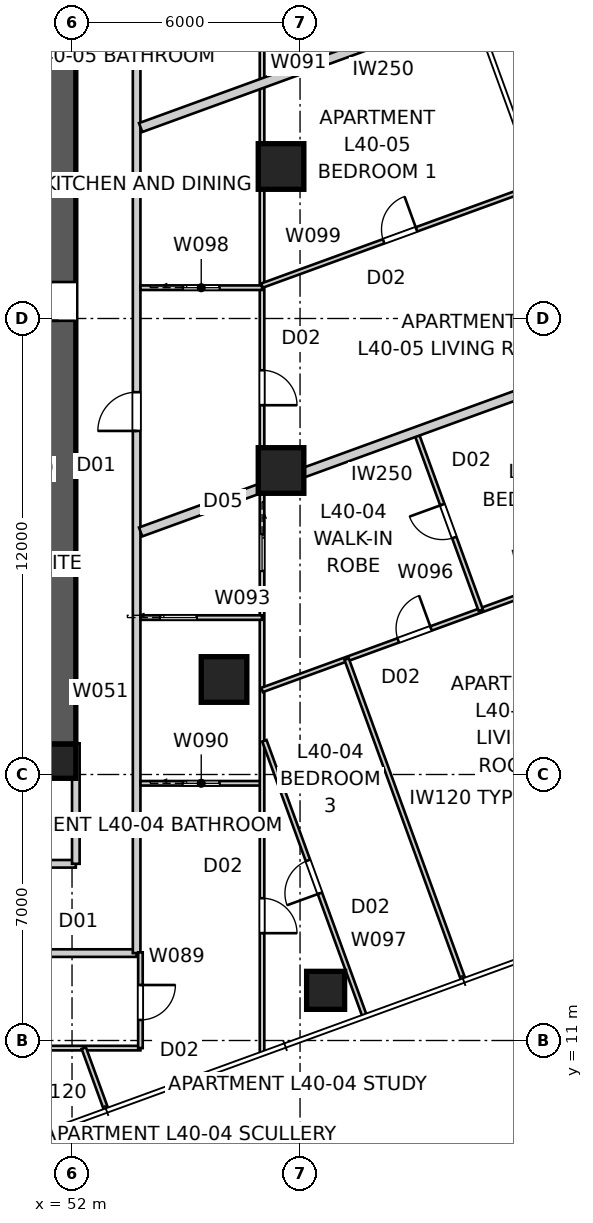
"""IFC4 building model, lengths in metres.
Left out: names, types, materials, properties, quantities, classifications, styles, units other than length and angle.
Written with IfcOpenShell. Run it as: python <this file> out.ifc"""

import sys

from ifc_helpers import new_model, si_unit, direction, frame, frame_2d, origin, origin_2d, place, context, subcontext, project, spatial, polyline, rectangle, outline, extrude, element, fill, save


model = new_model("IFC4")
c1 = context("Model", 3, precision=1e-05, world=origin(), true_north=direction((0.0, 1.0)))
c2 = subcontext(c1, "Body", "Model", "MODEL_VIEW")
j1 = project(units=[si_unit("LENGTHUNIT", "METRE"), si_unit("PLANEANGLEUNIT", "RADIAN")], contexts=[c1])
p1 = place(None, origin())
s1 = spatial("IfcSite", under=j1, at=p1, CompositionType="ELEMENT")
p2 = place(p1, origin())
s2 = spatial("IfcBuilding", under=s1, at=p2, CompositionType="ELEMENT")
p3 = place(p2, frame((0.0, 0.0, 147.2)))
s3 = spatial("IfcBuildingStorey", under=s2, at=p3, CompositionType="ELEMENT", Elevation=147.2)
p4 = place(p3, frame((51.2, 18.35, 0.0), z_axis=(0.0, 0.0, 1.0), x_axis=(-1.0, 0.0, 0.0)))
e1 = element("IfcWall", 1, at=p4, inside=s3, PredefinedType="SHEAR", context=c2, shape_type="SweptSolid", body=[
    extrude(outline(polyline([(0.0, -0.45), (22.4, -0.45), (22.4, -0.025), (22.85, -0.025), (22.85, 0.025), (22.4, 0.025), (22.4, 0.45), (0.0, 0.45), (0.0, 0.025), (-0.45, 0.025), (-0.45, -0.025), (0.0, -0.025), (0.0, -0.45)])), origin(), (0.0, 0.0, 1.0), 3.4),
])
p5 = place(p3, frame((51.65, 18.8, 0.0), z_axis=(0.0, 0.0, 1.0), x_axis=(0.0, 1.0, 0.0)))
e2 = element("IfcWall", 2, at=p5, inside=s3, PredefinedType="SHEAR", context=c2, shape_type="SweptSolid", body=[
    extrude(outline(polyline([(0.0, -0.45), (22.4, -0.45), (22.4, -0.025), (22.85, -0.025), (22.85, 0.025), (22.4, 0.025), (22.4, 0.45), (0.0, 0.45), (0.0, 0.025), (-0.45, 0.025), (-0.45, -0.025), (0.0, -0.025), (0.0, -0.45)])), origin(), (0.0, 0.0, 1.0), 3.4),
])
p6 = place(p5, frame((11.14, 0.0, 0.0)))
e3 = element("IfcOpeningElement", 3, at=p6, cuts=e2, PredefinedType="OPENING", context=c2, shape_type="SweptSolid", body=[
    extrude(rectangle(XDim=1.02, YDim=2.4, at=frame_2d((0.51, 1.2))), frame((0.0, 0.46, 0.0), z_axis=(0.0, -1.0, 0.0), x_axis=(1.0, 0.0, 0.0)), (0.0, 0.0, 1.0), 0.92),
])
p7 = place(p3, frame((51.65, 18.35, 0.0), z_axis=(0.0, 0.0, 1.0), x_axis=(1.0, 0.0, 0.0)))
e4 = element("IfcColumn", 4, at=p7, inside=s3, PredefinedType="COLUMN", context=c2, shape_type="SweptSolid", body=[
    extrude(rectangle(XDim=0.9, YDim=0.9, at=origin_2d()), origin(), (0.0, 0.0, 1.0), 3.4),
])
p8 = place(p3, frame((58.673, 12.32, 0.0), z_axis=(0.0, 0.0, 1.0), x_axis=(1.0, 0.0, 0.0)))
e5 = element("IfcColumn", 5, at=p8, inside=s3, PredefinedType="COLUMN", context=c2, shape_type="SweptSolid", body=[
    extrude(rectangle(XDim=1.0, YDim=1.0, at=origin_2d()), origin(), (0.0, 0.0, 1.0), 3.4),
])
for number, where, z_axis, x_axis in (
    (6, (57.5, 26.0, 0.0), (0.0, 0.0, 1.0), (1.0, 0.0, 0.0)),
    (7, (57.5, 34.0, 0.0), (0.0, 0.0, 1.0), (1.0, 0.0, 0.0)),
    (8, (56.0, 20.5, 0.0), (0.0, 0.0, 1.0), (1.0, 0.0, 0.0)),
):
    element("IfcColumn", number, at=place(p3, frame(where, z_axis=z_axis, x_axis=x_axis)), inside=s3, PredefinedType="COLUMN", context=c2, shape_type="SweptSolid", body=[
        extrude(rectangle(XDim=1.2, YDim=1.2, at=origin_2d()), origin(), (0.0, 0.0, 1.0), 3.4),
    ])
p9 = place(p3, frame((47.775, 13.3, 0.0), z_axis=(0.0, 0.0, 1.0), x_axis=(1.0, 0.0, 0.0)))
e9 = element("IfcWall", 9, at=p9, inside=s3, PredefinedType="PARTITIONING", context=c2, shape_type="SweptSolid", body=[
    extrude(rectangle(XDim=5.925, YDim=0.2, at=frame_2d((2.962, 0.0))), origin(), (0.0, 0.0, 1.0), 3.25),
])
p10 = place(p9, frame((2.453, 0.0, 0.0)))
e10 = element("IfcOpeningElement", 10, at=p10, cuts=e9, PredefinedType="OPENING", context=c2, shape_type="SweptSolid", body=[
    extrude(rectangle(XDim=1.02, YDim=2.34, at=frame_2d((0.51, 1.17))), frame((0.0, 0.11, 0.0), z_axis=(0.0, -1.0, 0.0), x_axis=(1.0, 0.0, 0.0)), (0.0, 0.0, 1.0), 0.22),
])
p11 = place(p3, frame((53.7, 13.3, 0.0), z_axis=(0.0, 0.0, 1.0), x_axis=(0.0, 1.0, 0.0)))
e11 = element("IfcWall", 11, at=p11, inside=s3, PredefinedType="PARTITIONING", context=c2, shape_type="SweptSolid", body=[
    extrude(rectangle(XDim=33.0, YDim=0.2, at=frame_2d((16.5, 0.0))), origin(), (0.0, 0.0, 1.0), 3.25),
])
p12 = place(p11, frame((28.411, 0.0, 0.0)))
e12 = element("IfcOpeningElement", 12, at=p12, cuts=e11, PredefinedType="OPENING", context=c2, shape_type="SweptSolid", body=[
    extrude(rectangle(XDim=1.02, YDim=2.1, at=frame_2d((0.51, 1.05))), frame((0.0, 0.11, 0.0), z_axis=(0.0, -1.0, 0.0), x_axis=(1.0, 0.0, 0.0)), (0.0, 0.0, 1.0), 0.22),
])
p13 = place(p11, frame((13.741, 0.0, 0.0)))
e13 = element("IfcOpeningElement", 13, at=p13, cuts=e11, PredefinedType="OPENING", context=c2, shape_type="SweptSolid", body=[
    extrude(rectangle(XDim=1.02, YDim=2.34, at=frame_2d((0.51, 1.17))), frame((0.0, 0.11, 0.0), z_axis=(0.0, -1.0, 0.0), x_axis=(1.0, 0.0, 0.0)), (0.0, 0.0, 1.0), 0.22),
])
p14 = place(p3, frame((62.553, 38.208, 0.0), z_axis=(0.0, 0.0, 1.0), x_axis=(-0.939693071685, -0.342018904489, 0.0)))
e14 = element("IfcWall", 14, at=p14, inside=s3, PredefinedType="PARTITIONING", context=c2, shape_type="SweptSolid", body=[
    extrude(rectangle(XDim=9.309, YDim=0.25, at=frame_2d((4.654, 0.0))), origin(), (0.0, 0.0, 1.0), 3.25),
])
p15 = place(p3, frame((65.973, 28.812, 0.0), z_axis=(0.0, 0.0, 1.0), x_axis=(-0.939692090592, -0.342021600019, 0.0)))
e15 = element("IfcWall", 15, at=p15, inside=s3, PredefinedType="PARTITIONING", context=c2, shape_type="SweptSolid", body=[
    extrude(rectangle(XDim=12.949, YDim=0.25, at=frame_2d((6.474, 0.0))), origin(), (0.0, 0.0, 1.0), 3.25),
])
p16 = place(p3, frame((27.9, 15.65, 0.0), z_axis=(0.0, 0.0, 1.0), x_axis=(1.0, 0.0, 0.0)))
e16 = element("IfcWall", 16, at=p16, inside=s3, PredefinedType="PARTITIONING", context=c2, shape_type="SweptSolid", body=[
    extrude(rectangle(XDim=24.2, YDim=0.2, at=frame_2d((12.1, 0.0))), origin(), (0.0, 0.0, 1.0), 3.25),
])
p17 = place(p16, frame((12.437, 0.0, 0.0)))
e17 = element("IfcOpeningElement", 17, at=p17, cuts=e16, PredefinedType="OPENING", context=c2, shape_type="SweptSolid", body=[
    extrude(rectangle(XDim=1.02, YDim=2.1, at=frame_2d((0.51, 1.05))), frame((0.0, 0.11, 0.0), z_axis=(0.0, -1.0, 0.0), x_axis=(1.0, 0.0, 0.0)), (0.0, 0.0, 1.0), 0.22),
])
p18 = place(p16, frame((3.544, 0.0, 0.0)))
e18 = element("IfcOpeningElement", 18, at=p18, cuts=e16, PredefinedType="OPENING", context=c2, shape_type="SweptSolid", body=[
    extrude(rectangle(XDim=1.02, YDim=2.1, at=frame_2d((0.51, 1.05))), frame((0.0, 0.11, 0.0), z_axis=(0.0, -1.0, 0.0), x_axis=(1.0, 0.0, 0.0)), (0.0, 0.0, 1.0), 0.22),
])
p19 = place(p16, frame((19.883, 0.0, 0.0)))
e19 = element("IfcOpeningElement", 19, at=p19, cuts=e16, PredefinedType="OPENING", context=c2, shape_type="SweptSolid", body=[
    extrude(rectangle(XDim=1.02, YDim=2.1, at=frame_2d((0.51, 1.05))), frame((0.0, 0.11, 0.0), z_axis=(0.0, -1.0, 0.0), x_axis=(1.0, 0.0, 0.0)), (0.0, 0.0, 1.0), 0.22),
])
p20 = place(p3, frame((52.1, 15.65, 0.0), z_axis=(0.0, 0.0, 1.0), x_axis=(0.0, 1.0, 0.0)))
e20 = element("IfcWall", 20, at=p20, inside=s3, PredefinedType="PARTITIONING", context=c2, shape_type="SweptSolid", body=[
    extrude(rectangle(XDim=3.17, YDim=0.2, at=frame_2d((1.585, 0.0))), origin(), (0.0, 0.0, 1.0), 3.25),
])
p21 = place(p3, frame((53.8, 10.8, 0.0), z_axis=(0.0, 0.0, 1.0), x_axis=(-1.0, 0.0, 0.0)))
e21 = element("IfcWall", 21, at=p21, inside=s3, PredefinedType="PARTITIONING", context=c2, shape_type="SweptSolid", body=[
    extrude(rectangle(XDim=17.884, YDim=0.12, at=frame_2d((8.942, 0.0))), origin(), (0.0, 0.0, 1.0), 3.25),
])
p22 = place(p21, frame((3.665, 0.0, 0.0)))
e22 = element("IfcOpeningElement", 22, at=p22, cuts=e21, PredefinedType="OPENING", context=c2, shape_type="SweptSolid", body=[
    extrude(rectangle(XDim=0.92, YDim=2.34, at=frame_2d((0.46, 1.17))), frame((0.0, 0.07, 0.0), z_axis=(0.0, -1.0, 0.0), x_axis=(1.0, 0.0, 0.0)), (0.0, 0.0, 1.0), 0.14),
])
p23 = place(p21, frame((14.497, 0.0, 0.0)))
e23 = element("IfcOpeningElement", 23, at=p23, cuts=e21, PredefinedType="OPENING", context=c2, shape_type="SweptSolid", body=[
    extrude(rectangle(XDim=0.96, YDim=2.1, at=frame_2d((0.48, 1.05))), frame((0.0, 0.07, 0.0), z_axis=(0.0, -1.0, 0.0), x_axis=(1.0, 0.0, 0.0)), (0.0, 0.0, 1.0), 0.14),
])
p24 = place(p3, frame((53.8, 13.32, 0.0), z_axis=(0.0, 0.0, 1.0), x_axis=(0.0, -1.0, 0.0)))
e24 = element("IfcWall", 24, at=p24, inside=s3, PredefinedType="PARTITIONING", context=c2, shape_type="SweptSolid", body=[
    extrude(rectangle(XDim=2.52, YDim=0.12, at=frame_2d((1.26, 0.0))), origin(), (0.0, 0.0, 1.0), 3.25),
])
p25 = place(p24, frame((0.86, 0.0, 0.0)))
e25 = element("IfcOpeningElement", 25, at=p25, cuts=e24, PredefinedType="OPENING", context=c2, shape_type="SweptSolid", body=[
    extrude(rectangle(XDim=0.92, YDim=2.34, at=frame_2d((0.46, 1.17))), frame((0.0, 0.07, 0.0), z_axis=(0.0, -1.0, 0.0), x_axis=(1.0, 0.0, 0.0)), (0.0, 0.0, 1.0), 0.14),
])
p26 = place(p3, frame((53.8, 17.769, 0.0), z_axis=(0.0, 0.0, 1.0), x_axis=(1.0, 0.0, 0.0)))
e26 = element("IfcWall", 26, at=p26, inside=s3, PredefinedType="PARTITIONING", context=c2, shape_type="SweptSolid", body=[
    extrude(rectangle(XDim=3.2, YDim=0.12, at=frame_2d((1.6, 0.0))), origin(), (0.0, 0.0, 1.0), 3.25),
])
p27 = place(p26, frame((1.12, 0.0, 0.0)))
e27 = element("IfcOpeningElement", 27, at=p27, cuts=e26, PredefinedType="OPENING", context=c2, shape_type="SweptSolid", body=[
    extrude(rectangle(XDim=0.96, YDim=2.1, at=frame_2d((0.48, 1.05))), frame((0.0, 0.07, 0.0), z_axis=(0.0, -1.0, 0.0), x_axis=(1.0, 0.0, 0.0)), (0.0, 0.0, 1.0), 0.14),
])
p28 = place(p3, frame((57.0, 48.8, 0.0), z_axis=(0.0, 0.0, 1.0), x_axis=(0.0, -1.0, 0.0)))
e28 = element("IfcWall", 28, at=p28, inside=s3, PredefinedType="PARTITIONING", context=c2, shape_type="SweptSolid", body=[
    extrude(rectangle(XDim=38.113, YDim=0.12, at=frame_2d((19.056, 0.0))), origin(), (0.0, 0.0, 1.0), 2.55),
])
p29 = place(p28, frame((4.198, 0.0, 0.0)))
e29 = element("IfcOpeningElement", 29, at=p29, cuts=e28, PredefinedType="OPENING", context=c2, shape_type="SweptSolid", body=[
    extrude(rectangle(XDim=0.92, YDim=2.34, at=frame_2d((0.46, 1.17))), frame((0.0, 0.07, 0.0), z_axis=(0.0, -1.0, 0.0), x_axis=(1.0, 0.0, 0.0)), (0.0, 0.0, 1.0), 0.14),
])
p30 = place(p28, frame((7.692, 0.0, 0.0)))
e30 = element("IfcOpeningElement", 30, at=p30, cuts=e28, PredefinedType="OPENING", context=c2, shape_type="SweptSolid", body=[
    extrude(rectangle(XDim=0.92, YDim=2.34, at=frame_2d((0.46, 1.17))), frame((0.0, 0.07, 0.0), z_axis=(0.0, -1.0, 0.0), x_axis=(1.0, 0.0, 0.0)), (0.0, 0.0, 1.0), 0.14),
])
p31 = place(p28, frame((20.162, 0.0, 0.0)))
e31 = element("IfcOpeningElement", 31, at=p31, cuts=e28, PredefinedType="OPENING", context=c2, shape_type="SweptSolid", body=[
    extrude(rectangle(XDim=0.92, YDim=2.34, at=frame_2d((0.46, 1.17))), frame((0.0, 0.07, 0.0), z_axis=(0.0, -1.0, 0.0), x_axis=(1.0, 0.0, 0.0)), (0.0, 0.0, 1.0), 0.14),
])
p32 = place(p28, frame((34.056, 0.0, 0.0)))
e32 = element("IfcOpeningElement", 32, at=p32, cuts=e28, PredefinedType="OPENING", context=c2, shape_type="SweptSolid", body=[
    extrude(rectangle(XDim=0.92, YDim=2.34, at=frame_2d((0.46, 1.17))), frame((0.0, 0.07, 0.0), z_axis=(0.0, -1.0, 0.0), x_axis=(1.0, 0.0, 0.0)), (0.0, 0.0, 1.0), 0.14),
])
p33 = place(p28, frame((24.482, 0.0, 0.0)))
e33 = element("IfcOpeningElement", 33, at=p33, cuts=e28, PredefinedType="OPENING", context=c2, shape_type="SweptSolid", body=[
    extrude(rectangle(XDim=0.96, YDim=2.1, at=frame_2d((0.48, 1.05))), frame((0.0, 0.07, 0.0), z_axis=(0.0, -1.0, 0.0), x_axis=(1.0, 0.0, 0.0)), (0.0, 0.0, 1.0), 0.14),
])
p34 = place(p3, frame((52.893, 9.195, 0.0), z_axis=(0.0, 0.0, 1.0), x_axis=(-0.342052919471, 0.939680690597, 0.0)))
e34 = element("IfcWall", 34, at=p34, inside=s3, PredefinedType="PARTITIONING", context=c2, shape_type="SweptSolid", body=[
    extrude(rectangle(XDim=1.708, YDim=0.12, at=frame_2d((0.854, 0.0))), origin(), (0.0, 0.0, 1.0), 3.25),
])
p35 = place(p3, frame((53.8, 22.129, 0.0), z_axis=(0.0, 0.0, 1.0), x_axis=(1.0, 0.0, 0.0)))
e35 = element("IfcWall", 35, at=p35, inside=s3, PredefinedType="PARTITIONING", context=c2, shape_type="SweptSolid", body=[
    extrude(rectangle(XDim=3.2, YDim=0.12, at=frame_2d((1.6, 0.0))), origin(), (0.0, 0.0, 1.0), 3.25),
])
p36 = place(p35, frame((0.52, 0.0, 0.0)))
e36 = element("IfcOpeningElement", 36, at=p36, cuts=e35, PredefinedType="OPENING", context=c2, shape_type="SweptSolid", body=[
    extrude(rectangle(XDim=0.96, YDim=2.1, at=frame_2d((0.48, 1.05))), frame((0.0, 0.07, 0.0), z_axis=(0.0, -1.0, 0.0), x_axis=(1.0, 0.0, 0.0)), (0.0, 0.0, 1.0), 0.14),
])
p37 = place(p3, frame((57.0, 20.225, 0.0), z_axis=(0.0, 0.0, 1.0), x_axis=(0.939693965364, 0.342016449105, 0.0)))
e37 = element("IfcWall", 37, at=p37, inside=s3, PredefinedType="PARTITIONING", context=c2, shape_type="SweptSolid", body=[
    extrude(rectangle(XDim=11.328, YDim=0.12, at=frame_2d((5.664, 0.0))), origin(), (0.0, 0.0, 1.0), 3.25),
])
p38 = place(p37, frame((3.812, 0.0, 0.0)))
e38 = element("IfcOpeningElement", 38, at=p38, cuts=e37, PredefinedType="OPENING", context=c2, shape_type="SweptSolid", body=[
    extrude(rectangle(XDim=0.92, YDim=2.34, at=frame_2d((0.46, 1.17))), frame((0.0, 0.07, 0.0), z_axis=(0.0, -1.0, 0.0), x_axis=(1.0, 0.0, 0.0)), (0.0, 0.0, 1.0), 0.14),
])
p39 = place(p3, frame((62.29, 12.615, 0.0), z_axis=(0.0, 0.0, 1.0), x_axis=(-0.342038393654, 0.939685978009, 0.0)))
e39 = element("IfcWall", 39, at=p39, inside=s3, PredefinedType="PARTITIONING", context=c2, shape_type="SweptSolid", body=[
    extrude(rectangle(XDim=8.96, YDim=0.12, at=frame_2d((4.48, 0.0))), origin(), (0.0, 0.0, 1.0), 3.25),
])
p40 = place(p3, frame((62.757, 22.32, 0.0), z_axis=(0.0, 0.0, 1.0), x_axis=(-0.341993964619, 0.939702148643, 0.0)))
e40 = element("IfcWall", 40, at=p40, inside=s3, PredefinedType="PARTITIONING", context=c2, shape_type="SweptSolid", body=[
    extrude(rectangle(XDim=5.0, YDim=0.12, at=frame_2d((2.5, 0.0))), origin(), (0.0, 0.0, 1.0), 3.25),
])
p41 = place(p40, frame((2.04, 0.0, 0.0)))
e41 = element("IfcOpeningElement", 41, at=p41, cuts=e40, PredefinedType="OPENING", context=c2, shape_type="SweptSolid", body=[
    extrude(rectangle(XDim=0.92, YDim=2.34, at=frame_2d((0.46, 1.17))), frame((0.0, 0.07, 0.0), z_axis=(0.0, -1.0, 0.0), x_axis=(1.0, 0.0, 0.0)), (0.0, 0.0, 1.0), 0.14),
])
p42 = place(p3, frame((59.689, 11.669, 0.0), z_axis=(0.0, 0.0, 1.0), x_axis=(-0.342003311293, 0.939698746974, 0.0)))
e42 = element("IfcWall", 42, at=p42, inside=s3, PredefinedType="PARTITIONING", context=c2, shape_type="SweptSolid", body=[
    extrude(rectangle(XDim=7.683, YDim=0.12, at=frame_2d((3.841, 0.0))), origin(), (0.0, 0.0, 1.0), 3.25),
])
p43 = place(p42, frame((3.411, 0.0, 0.0)))
e43 = element("IfcOpeningElement", 43, at=p43, cuts=e42, PredefinedType="OPENING", context=c2, shape_type="SweptSolid", body=[
    extrude(rectangle(XDim=0.92, YDim=2.34, at=frame_2d((0.46, 1.17))), frame((0.0, 0.07, 0.0), z_axis=(0.0, -1.0, 0.0), x_axis=(1.0, 0.0, 0.0)), (0.0, 0.0, 1.0), 0.14),
])
p44 = place(p3, frame((53.8, 30.81, 0.0), z_axis=(0.0, 0.0, 1.0), x_axis=(1.0, 0.0, 0.0)))
e44 = element("IfcWall", 44, at=p44, inside=s3, PredefinedType="PARTITIONING", context=c2, shape_type="SweptSolid", body=[
    extrude(rectangle(XDim=3.2, YDim=0.12, at=frame_2d((1.6, 0.0))), origin(), (0.0, 0.0, 1.0), 3.25),
])
p45 = place(p44, frame((1.12, 0.0, 0.0)))
e45 = element("IfcOpeningElement", 45, at=p45, cuts=e44, PredefinedType="OPENING", context=c2, shape_type="SweptSolid", body=[
    extrude(rectangle(XDim=0.96, YDim=2.1, at=frame_2d((0.48, 1.05))), frame((0.0, 0.07, 0.0), z_axis=(0.0, -1.0, 0.0), x_axis=(1.0, 0.0, 0.0)), (0.0, 0.0, 1.0), 0.14),
])
p46 = place(p3, frame((57.0, 30.866, 0.0), z_axis=(0.0, 0.0, 1.0), x_axis=(0.939685835373, 0.342038785519, 0.0)))
e46 = element("IfcWall", 46, at=p46, inside=s3, PredefinedType="PARTITIONING", context=c2, shape_type="SweptSolid", body=[
    extrude(rectangle(XDim=7.689, YDim=0.12, at=frame_2d((3.844, 0.0))), origin(), (0.0, 0.0, 1.0), 3.25),
])
p47 = place(p46, frame((3.404, 0.0, 0.0)))
e47 = element("IfcOpeningElement", 47, at=p47, cuts=e46, PredefinedType="OPENING", context=c2, shape_type="SweptSolid", body=[
    extrude(rectangle(XDim=0.92, YDim=2.34, at=frame_2d((0.46, 1.17))), frame((0.0, 0.07, 0.0), z_axis=(0.0, -1.0, 0.0), x_axis=(1.0, 0.0, 0.0)), (0.0, 0.0, 1.0), 0.14),
])
p48 = place(p13, origin())
e48 = element("IfcDoor", 48, at=p48, inside=s3, OperationType="SINGLE_SWING_LEFT", PredefinedType="DOOR", context=c2, shape_type="SweptSolid", body=[
    extrude(rectangle(XDim=1.02, YDim=2.34, at=frame_2d((0.51, 1.17))), frame((0.0, 0.025, 0.0), z_axis=(0.0, -1.0, 0.0), x_axis=(1.0, 0.0, 0.0)), (0.0, 0.0, 1.0), 0.05),
])
fill(e13, e48)
p49 = place(p25, origin())
e49 = element("IfcDoor", 49, at=p49, inside=s3, OperationType="SINGLE_SWING_LEFT", PredefinedType="DOOR", context=c2, shape_type="SweptSolid", body=[
    extrude(rectangle(XDim=0.92, YDim=2.34, at=frame_2d((0.46, 1.17))), frame((0.0, 0.025, 0.0), z_axis=(0.0, -1.0, 0.0), x_axis=(1.0, 0.0, 0.0)), (0.0, 0.0, 1.0), 0.05),
])
fill(e25, e49)
p50 = place(p31, origin())
e50 = element("IfcDoor", 50, at=p50, inside=s3, OperationType="SINGLE_SWING_RIGHT", PredefinedType="DOOR", context=c2, shape_type="SweptSolid", body=[
    extrude(rectangle(XDim=0.92, YDim=2.34, at=frame_2d((0.46, 1.17))), frame((0.0, 0.025, 0.0), z_axis=(0.0, -1.0, 0.0), x_axis=(1.0, 0.0, 0.0)), (0.0, 0.0, 1.0), 0.05),
])
fill(e31, e50)
p51 = place(p45, origin())
e51 = element("IfcDoor", 51, at=p51, inside=s3, OperationType="SLIDING_TO_LEFT", PredefinedType="DOOR", context=c2, shape_type="SweptSolid", body=[
    extrude(rectangle(XDim=0.96, YDim=2.1, at=frame_2d((0.48, 1.05))), frame((0.0, 0.025, 0.0), z_axis=(0.0, -1.0, 0.0), x_axis=(1.0, 0.0, 0.0)), (0.0, 0.0, 1.0), 0.05),
])
fill(e45, e51)
p52 = place(p32, origin())
e52 = element("IfcDoor", 52, at=p52, inside=s3, OperationType="SINGLE_SWING_RIGHT", PredefinedType="DOOR", context=c2, shape_type="SweptSolid", body=[
    extrude(rectangle(XDim=0.92, YDim=2.34, at=frame_2d((0.46, 1.17))), frame((0.0, 0.025, 0.0), z_axis=(0.0, -1.0, 0.0), x_axis=(1.0, 0.0, 0.0)), (0.0, 0.0, 1.0), 0.05),
])
fill(e32, e52)
p53 = place(p27, origin())
e53 = element("IfcDoor", 53, at=p53, inside=s3, OperationType="SLIDING_TO_LEFT", PredefinedType="DOOR", context=c2, shape_type="SweptSolid", body=[
    extrude(rectangle(XDim=0.96, YDim=2.1, at=frame_2d((0.48, 1.05))), frame((0.0, 0.025, 0.0), z_axis=(0.0, -1.0, 0.0), x_axis=(1.0, 0.0, 0.0)), (0.0, 0.0, 1.0), 0.05),
])
fill(e27, e53)
p54 = place(p47, origin())
e54 = element("IfcDoor", 54, at=p54, inside=s3, OperationType="SINGLE_SWING_RIGHT", PredefinedType="DOOR", context=c2, shape_type="SweptSolid", body=[
    extrude(rectangle(XDim=0.92, YDim=2.34, at=frame_2d((0.46, 1.17))), frame((0.0, 0.025, 0.0), z_axis=(0.0, -1.0, 0.0), x_axis=(1.0, 0.0, 0.0)), (0.0, 0.0, 1.0), 0.05),
])
fill(e47, e54)
p55 = place(p43, origin())
e55 = element("IfcDoor", 55, at=p55, inside=s3, OperationType="SINGLE_SWING_LEFT", PredefinedType="DOOR", context=c2, shape_type="SweptSolid", body=[
    extrude(rectangle(XDim=0.92, YDim=2.34, at=frame_2d((0.46, 1.17))), frame((0.0, 0.025, 0.0), z_axis=(0.0, -1.0, 0.0), x_axis=(1.0, 0.0, 0.0)), (0.0, 0.0, 1.0), 0.05),
])
fill(e43, e55)
p56 = place(p36, origin())
e56 = element("IfcDoor", 56, at=p56, inside=s3, OperationType="SLIDING_TO_LEFT", PredefinedType="DOOR", context=c2, shape_type="SweptSolid", body=[
    extrude(rectangle(XDim=0.96, YDim=2.1, at=frame_2d((0.48, 1.05))), frame((0.0, 0.025, 0.0), z_axis=(0.0, -1.0, 0.0), x_axis=(1.0, 0.0, 0.0)), (0.0, 0.0, 1.0), 0.05),
])
fill(e36, e56)
p57 = place(p33, origin())
e57 = element("IfcDoor", 57, at=p57, inside=s3, OperationType="SLIDING_TO_LEFT", PredefinedType="DOOR", context=c2, shape_type="SweptSolid", body=[
    extrude(rectangle(XDim=0.96, YDim=2.1, at=frame_2d((0.48, 1.05))), frame((0.0, 0.025, 0.0), z_axis=(0.0, -1.0, 0.0), x_axis=(1.0, 0.0, 0.0)), (0.0, 0.0, 1.0), 0.05),
])
fill(e33, e57)
p58 = place(p41, origin())
e58 = element("IfcDoor", 58, at=p58, inside=s3, OperationType="SINGLE_SWING_RIGHT", PredefinedType="DOOR", context=c2, shape_type="SweptSolid", body=[
    extrude(rectangle(XDim=0.92, YDim=2.34, at=frame_2d((0.46, 1.17))), frame((0.0, 0.025, 0.0), z_axis=(0.0, -1.0, 0.0), x_axis=(1.0, 0.0, 0.0)), (0.0, 0.0, 1.0), 0.05),
])
fill(e41, e58)
p59 = place(p38, origin())
e59 = element("IfcDoor", 59, at=p59, inside=s3, OperationType="SINGLE_SWING_RIGHT", PredefinedType="DOOR", context=c2, shape_type="SweptSolid", body=[
    extrude(rectangle(XDim=0.92, YDim=2.34, at=frame_2d((0.46, 1.17))), frame((0.0, 0.025, 0.0), z_axis=(0.0, -1.0, 0.0), x_axis=(1.0, 0.0, 0.0)), (0.0, 0.0, 1.0), 0.05),
])
fill(e38, e59)
p60 = place(p6, origin())
e60 = element("IfcDoor", 60, at=p60, inside=s3, OperationType="SINGLE_SWING_LEFT", PredefinedType="DOOR", context=c2, shape_type="SweptSolid", body=[
    extrude(rectangle(XDim=1.02, YDim=2.4, at=frame_2d((0.51, 1.2))), frame((0.0, 0.025, 0.0), z_axis=(0.0, -1.0, 0.0), x_axis=(1.0, 0.0, 0.0)), (0.0, 0.0, 1.0), 0.05),
])
fill(e3, e60)
save(model, sys.argv[1])
